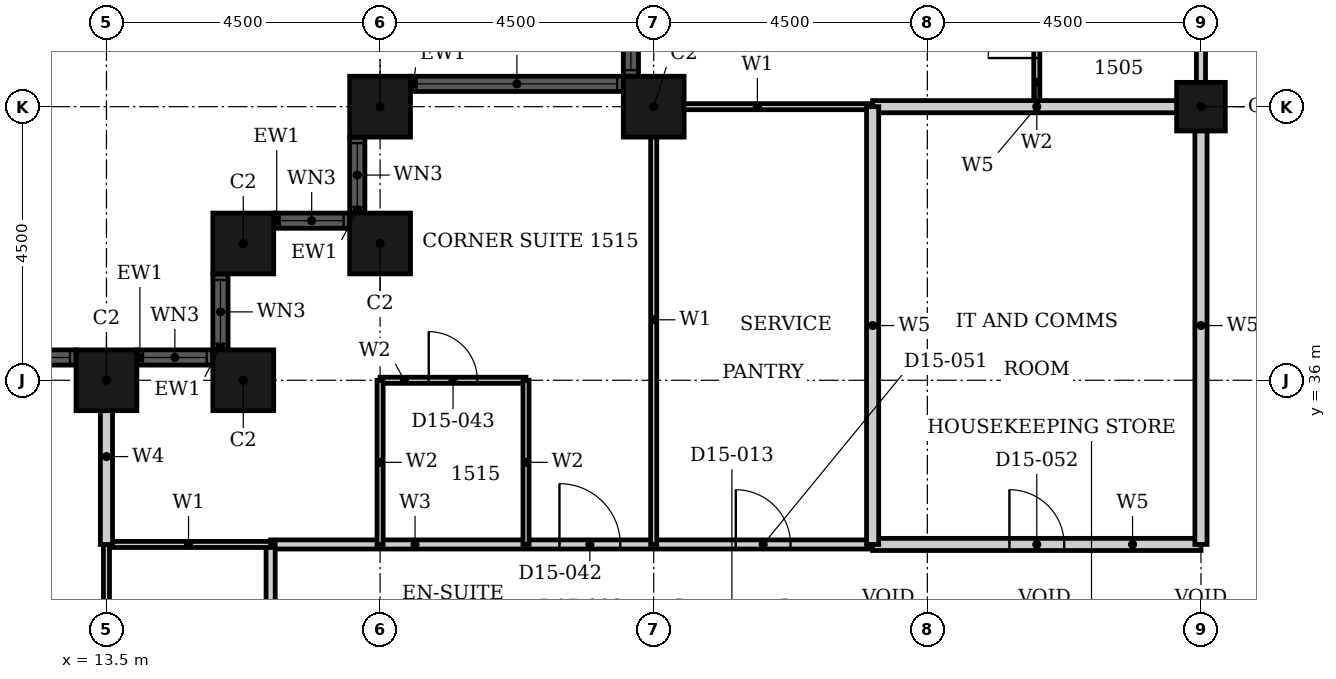
"""IFC4 building model, lengths in metres.
Left out: names, types, materials, properties, quantities, classifications, styles, units other than length and angle.
Written with IfcOpenShell. Run it as: python <this file> out.ifc"""

import sys

from ifc_helpers import new_model, si_unit, direction, frame, frame_2d, origin, origin_2d, place, context, subcontext, project, spatial, rectangle, hollow_rectangle, extrude, element, fill, save


model = new_model("IFC4")
c1 = context("Model", 3, precision=1e-05, world=origin(), true_north=direction((0.0, 1.0)))
c2 = subcontext(c1, "Body", "Model", "MODEL_VIEW")
j1 = project(units=[si_unit("LENGTHUNIT", "METRE"), si_unit("PLANEANGLEUNIT", "RADIAN")], contexts=[c1])
p1 = place(None, origin())
s1 = spatial("IfcSite", under=j1, at=p1, CompositionType="ELEMENT")
p2 = place(p1, origin())
s2 = spatial("IfcBuilding", under=s1, at=p2, CompositionType="ELEMENT")
p3 = place(p2, frame((0.0, 0.0, 67.2)))
s3 = spatial("IfcBuildingStorey", under=s2, at=p3, CompositionType="ELEMENT", Elevation=67.2)
for number, where, z_axis, x_axis in (
    (1, (22.5, 40.5, 0.0), (0.0, 0.0, 1.0), (1.0, 0.0, 0.0)),
    (2, (18.0, 40.5, 0.0), (0.0, 0.0, 1.0), (1.0, 0.0, 0.0)),
    (3, (18.0, 38.25, 0.0), (0.0, 0.0, 1.0), (1.0, 0.0, 0.0)),
    (4, (15.75, 38.25, 0.0), (0.0, 0.0, 1.0), (1.0, 0.0, 0.0)),
    (5, (15.75, 36.0, 0.0), (0.0, 0.0, 1.0), (1.0, 0.0, 0.0)),
    (6, (13.5, 36.0, 0.0), (0.0, 0.0, 1.0), (1.0, 0.0, 0.0)),
):
    element("IfcColumn", number, at=place(p3, frame(where, z_axis=z_axis, x_axis=x_axis)), inside=s3, PredefinedType="COLUMN", context=c2, shape_type="SweptSolid", body=[
        extrude(hollow_rectangle(XDim=1.0, YDim=1.0, WallThickness=0.032, at=origin_2d()), origin(), (0.0, 0.0, 1.0), 3.6),
    ])
p4 = place(p3, frame((31.5, 40.5, 0.0), z_axis=(0.0, 0.0, 1.0), x_axis=(1.0, 0.0, 0.0)))
e7 = element("IfcColumn", 7, at=p4, inside=s3, PredefinedType="COLUMN", context=c2, shape_type="SweptSolid", body=[
    extrude(hollow_rectangle(XDim=0.8, YDim=0.8, WallThickness=0.025, at=origin_2d()), origin(), (0.0, 0.0, 1.0), 3.6),
])
p5 = place(p3, frame((22.125, 49.0, 0.0), z_axis=(0.0, 0.0, 1.0), x_axis=(0.0, -1.0, 0.0)))
e8 = element("IfcWall", 8, at=p5, inside=s3, PredefinedType="SOLIDWALL", context=c2, shape_type="SweptSolid", body=[
    extrude(rectangle(XDim=8.0, YDim=0.25, at=frame_2d((4.0, 0.0))), origin(), (0.0, 0.0, 1.0), 3.6),
])
p6 = place(p5, frame((0.1, 0.0, 0.9)))
e9 = element("IfcOpeningElement", 9, at=p6, cuts=e8, PredefinedType="OPENING", context=c2, shape_type="SweptSolid", body=[
    extrude(rectangle(XDim=3.3, YDim=2.08, at=frame_2d((1.65, 1.04))), frame((0.0, 0.135, 0.0), z_axis=(0.0, -1.0, 0.0), x_axis=(1.0, 0.0, 0.0)), (0.0, 0.0, 1.0), 0.27),
])
p7 = place(p5, frame((4.6, 0.0, 0.9)))
e10 = element("IfcOpeningElement", 10, at=p7, cuts=e8, PredefinedType="OPENING", context=c2, shape_type="SweptSolid", body=[
    extrude(rectangle(XDim=3.3, YDim=2.08, at=frame_2d((1.65, 1.04))), frame((0.0, 0.135, 0.0), z_axis=(0.0, -1.0, 0.0), x_axis=(1.0, 0.0, 0.0)), (0.0, 0.0, 1.0), 0.27),
])
p8 = place(p3, frame((22.0, 40.875, 0.0), z_axis=(0.0, 0.0, 1.0), x_axis=(-1.0, 0.0, 0.0)))
e11 = element("IfcWall", 11, at=p8, inside=s3, PredefinedType="SOLIDWALL", context=c2, shape_type="SweptSolid", body=[
    extrude(rectangle(XDim=3.5, YDim=0.25, at=frame_2d((1.75, 0.0))), origin(), (0.0, 0.0, 1.0), 3.6),
])
p9 = place(p8, frame((0.1, 0.0, 0.9)))
e12 = element("IfcOpeningElement", 12, at=p9, cuts=e11, PredefinedType="OPENING", context=c2, shape_type="SweptSolid", body=[
    extrude(rectangle(XDim=3.3, YDim=2.08, at=frame_2d((1.65, 1.04))), frame((0.0, 0.135, 0.0), z_axis=(0.0, -1.0, 0.0), x_axis=(1.0, 0.0, 0.0)), (0.0, 0.0, 1.0), 0.27),
])
p10 = place(p3, frame((17.625, 40.0, 0.0), z_axis=(0.0, 0.0, 1.0), x_axis=(0.0, -1.0, 0.0)))
e13 = element("IfcWall", 13, at=p10, inside=s3, PredefinedType="SOLIDWALL", context=c2, shape_type="SweptSolid", body=[
    extrude(rectangle(XDim=1.25, YDim=0.25, at=frame_2d((0.625, 0.0))), origin(), (0.0, 0.0, 1.0), 3.6),
])
p11 = place(p10, frame((0.1, 0.0, 0.9)))
e14 = element("IfcOpeningElement", 14, at=p11, cuts=e13, PredefinedType="OPENING", context=c2, shape_type="SweptSolid", body=[
    extrude(rectangle(XDim=1.05, YDim=2.08, at=frame_2d((0.525, 1.04))), frame((0.0, 0.135, 0.0), z_axis=(0.0, -1.0, 0.0), x_axis=(1.0, 0.0, 0.0)), (0.0, 0.0, 1.0), 0.27),
])
p12 = place(p3, frame((17.5, 38.625, 0.0), z_axis=(0.0, 0.0, 1.0), x_axis=(-1.0, 0.0, 0.0)))
e15 = element("IfcWall", 15, at=p12, inside=s3, PredefinedType="SOLIDWALL", context=c2, shape_type="SweptSolid", body=[
    extrude(rectangle(XDim=1.25, YDim=0.25, at=frame_2d((0.625, 0.0))), origin(), (0.0, 0.0, 1.0), 3.6),
])
p13 = place(p12, frame((0.1, 0.0, 0.9)))
e16 = element("IfcOpeningElement", 16, at=p13, cuts=e15, PredefinedType="OPENING", context=c2, shape_type="SweptSolid", body=[
    extrude(rectangle(XDim=1.05, YDim=2.08, at=frame_2d((0.525, 1.04))), frame((0.0, 0.135, 0.0), z_axis=(0.0, -1.0, 0.0), x_axis=(1.0, 0.0, 0.0)), (0.0, 0.0, 1.0), 0.27),
])
p14 = place(p3, frame((15.375, 37.75, 0.0), z_axis=(0.0, 0.0, 1.0), x_axis=(0.0, -1.0, 0.0)))
e17 = element("IfcWall", 17, at=p14, inside=s3, PredefinedType="SOLIDWALL", context=c2, shape_type="SweptSolid", body=[
    extrude(rectangle(XDim=1.25, YDim=0.25, at=frame_2d((0.625, 0.0))), origin(), (0.0, 0.0, 1.0), 3.6),
])
p15 = place(p14, frame((0.1, 0.0, 0.9)))
e18 = element("IfcOpeningElement", 18, at=p15, cuts=e17, PredefinedType="OPENING", context=c2, shape_type="SweptSolid", body=[
    extrude(rectangle(XDim=1.05, YDim=2.08, at=frame_2d((0.525, 1.04))), frame((0.0, 0.135, 0.0), z_axis=(0.0, -1.0, 0.0), x_axis=(1.0, 0.0, 0.0)), (0.0, 0.0, 1.0), 0.27),
])
p16 = place(p3, frame((15.25, 36.375, 0.0), z_axis=(0.0, 0.0, 1.0), x_axis=(-1.0, 0.0, 0.0)))
e19 = element("IfcWall", 19, at=p16, inside=s3, PredefinedType="SOLIDWALL", context=c2, shape_type="SweptSolid", body=[
    extrude(rectangle(XDim=1.25, YDim=0.25, at=frame_2d((0.625, 0.0))), origin(), (0.0, 0.0, 1.0), 3.6),
])
p17 = place(p16, frame((0.1, 0.0, 0.9)))
e20 = element("IfcOpeningElement", 20, at=p17, cuts=e19, PredefinedType="OPENING", context=c2, shape_type="SweptSolid", body=[
    extrude(rectangle(XDim=1.05, YDim=2.08, at=frame_2d((0.525, 1.04))), frame((0.0, 0.135, 0.0), z_axis=(0.0, -1.0, 0.0), x_axis=(1.0, 0.0, 0.0)), (0.0, 0.0, 1.0), 0.27),
])
p18 = place(p3, frame((13.0, 36.375, 0.0), z_axis=(0.0, 0.0, 1.0), x_axis=(-1.0, 0.0, 0.0)))
e21 = element("IfcWall", 21, at=p18, inside=s3, PredefinedType="SOLIDWALL", context=c2, shape_type="SweptSolid", body=[
    extrude(rectangle(XDim=8.0, YDim=0.25, at=frame_2d((4.0, 0.0))), origin(), (0.0, 0.0, 1.0), 3.6),
])
p19 = place(p18, frame((0.1, 0.0, 0.9)))
e22 = element("IfcOpeningElement", 22, at=p19, cuts=e21, PredefinedType="OPENING", context=c2, shape_type="SweptSolid", body=[
    extrude(rectangle(XDim=3.3, YDim=2.08, at=frame_2d((1.65, 1.04))), frame((0.0, 0.135, 0.0), z_axis=(0.0, -1.0, 0.0), x_axis=(1.0, 0.0, 0.0)), (0.0, 0.0, 1.0), 0.27),
])
p20 = place(p18, frame((4.6, 0.0, 0.9)))
e23 = element("IfcOpeningElement", 23, at=p20, cuts=e21, PredefinedType="OPENING", context=c2, shape_type="SweptSolid", body=[
    extrude(rectangle(XDim=3.3, YDim=2.08, at=frame_2d((1.65, 1.04))), frame((0.0, 0.135, 0.0), z_axis=(0.0, -1.0, 0.0), x_axis=(1.0, 0.0, 0.0)), (0.0, 0.0, 1.0), 0.27),
])
p21 = place(p3, frame((16.2, 33.3, 0.0), z_axis=(0.0, 0.0, 1.0), x_axis=(1.0, 0.0, 0.0)))
e24 = element("IfcWall", 24, at=p21, inside=s3, PredefinedType="PARTITIONING", context=c2, shape_type="SweptSolid", body=[
    extrude(rectangle(XDim=9.9, YDim=0.15, at=frame_2d((4.95, 0.0))), origin(), (0.0, 0.0, 1.0), 3.3),
])
p22 = place(p21, frame((4.75, 0.0, 0.0)))
e25 = element("IfcOpeningElement", 25, at=p22, cuts=e24, PredefinedType="OPENING", context=c2, shape_type="SweptSolid", body=[
    extrude(rectangle(XDim=1.0, YDim=2.1, at=frame_2d((0.5, 1.05))), frame((0.0, 0.085, 0.0), z_axis=(0.0, -1.0, 0.0), x_axis=(1.0, 0.0, 0.0)), (0.0, 0.0, 1.0), 0.17),
])
p23 = place(p21, frame((7.65, 0.0, 0.0)))
e26 = element("IfcOpeningElement", 26, at=p23, cuts=e24, PredefinedType="OPENING", context=c2, shape_type="SweptSolid", body=[
    extrude(rectangle(XDim=0.9, YDim=2.1, at=frame_2d((0.45, 1.05))), frame((0.0, 0.085, 0.0), z_axis=(0.0, -1.0, 0.0), x_axis=(1.0, 0.0, 0.0)), (0.0, 0.0, 1.0), 0.17),
])
p24 = place(p3, frame((16.2, 27.0, 0.0), z_axis=(0.0, 0.0, 1.0), x_axis=(0.0, 1.0, 0.0)))
e27 = element("IfcWall", 27, at=p24, inside=s3, PredefinedType="PARTITIONING", context=c2, shape_type="SweptSolid", body=[
    extrude(rectangle(XDim=6.3, YDim=0.15, at=frame_2d((3.15, 0.0))), origin(), (0.0, 0.0, 1.0), 3.3),
])
p25 = place(p24, frame((2.55, 0.0, 0.0)))
e28 = element("IfcOpeningElement", 28, at=p25, cuts=e27, PredefinedType="OPENING", context=c2, shape_type="SweptSolid", body=[
    extrude(rectangle(XDim=0.9, YDim=2.1, at=frame_2d((0.45, 1.05))), frame((0.0, 0.085, 0.0), z_axis=(0.0, -1.0, 0.0), x_axis=(1.0, 0.0, 0.0)), (0.0, 0.0, 1.0), 0.17),
])
p26 = place(p3, frame((31.5, 40.5, 0.0), z_axis=(0.0, 0.0, 1.0), x_axis=(0.0, 1.0, 0.0)))
e29 = element("IfcWall", 29, at=p26, inside=s3, PredefinedType="PARTITIONING", context=c2, shape_type="SweptSolid", body=[
    extrude(rectangle(XDim=9.0, YDim=0.15, at=frame_2d((4.5, 0.0))), origin(), (0.0, 0.0, 1.0), 2.58),
])
p27 = place(p26, frame((2.95, 0.0, 0.0)))
e30 = element("IfcOpeningElement", 30, at=p27, cuts=e29, PredefinedType="OPENING", context=c2, shape_type="SweptSolid", body=[
    extrude(rectangle(XDim=1.0, YDim=2.1, at=frame_2d((0.5, 1.05))), frame((0.0, 0.085, 0.0), z_axis=(0.0, -1.0, 0.0), x_axis=(1.0, 0.0, 0.0)), (0.0, 0.0, 1.0), 0.17),
])
p28 = place(p26, frame((7.45, 0.0, 0.0)))
e31 = element("IfcOpeningElement", 31, at=p28, cuts=e29, PredefinedType="OPENING", context=c2, shape_type="SweptSolid", body=[
    extrude(rectangle(XDim=1.0, YDim=2.1, at=frame_2d((0.5, 1.05))), frame((0.0, 0.085, 0.0), z_axis=(0.0, -1.0, 0.0), x_axis=(1.0, 0.0, 0.0)), (0.0, 0.0, 1.0), 0.17),
])
p29 = place(p3, frame((13.5, 33.3, 0.0), z_axis=(0.0, 0.0, 1.0), x_axis=(1.0, 0.0, 0.0)))
e32 = element("IfcWall", 32, at=p29, inside=s3, PredefinedType="PARTITIONING", context=c2, shape_type="SweptSolid", body=[
    extrude(rectangle(XDim=2.7, YDim=0.1, at=frame_2d((1.35, 0.0))), origin(), (0.0, 0.0, 1.0), 3.3),
])
p30 = place(p3, frame((22.31, 40.5, 0.0), z_axis=(0.0, 0.0, 1.0), x_axis=(1.0, 0.0, 0.0)))
e33 = element("IfcWall", 33, at=p30, inside=s3, PredefinedType="PARTITIONING", context=c2, shape_type="SweptSolid", body=[
    extrude(rectangle(XDim=3.79, YDim=0.1, at=frame_2d((1.895, 0.0))), origin(), (0.0, 0.0, 1.0), 2.38),
])
p31 = place(p3, frame((13.5, 27.0, 0.0), z_axis=(0.0, 0.0, 1.0), x_axis=(0.0, 1.0, 0.0)))
e34 = element("IfcWall", 34, at=p31, inside=s3, PredefinedType="PARTITIONING", context=c2, shape_type="SweptSolid", body=[
    extrude(rectangle(XDim=6.3, YDim=0.1, at=frame_2d((3.15, 0.0))), origin(), (0.0, 0.0, 1.0), 2.38),
])
p32 = place(p3, frame((22.5, 33.3, 0.0), z_axis=(0.0, 0.0, 1.0), x_axis=(0.0, 1.0, 0.0)))
e35 = element("IfcWall", 35, at=p32, inside=s3, PredefinedType="PARTITIONING", context=c2, shape_type="SweptSolid", body=[
    extrude(rectangle(XDim=7.39, YDim=0.1, at=frame_2d((3.695, 0.0))), origin(), (0.0, 0.0, 1.0), 3.3),
])
p33 = place(p3, frame((13.5, 33.3, 0.0), z_axis=(0.0, 0.0, 1.0), x_axis=(0.0, 1.0, 0.0)))
e36 = element("IfcWall", 36, at=p33, inside=s3, PredefinedType="PARTITIONING", context=c2, shape_type="SweptSolid", body=[
    extrude(rectangle(XDim=2.89, YDim=0.2, at=frame_2d((1.445, 0.0))), origin(), (0.0, 0.0, 1.0), 2.38),
])
p34 = place(p3, frame((18.0, 36.0, 0.0), z_axis=(0.0, 0.0, 1.0), x_axis=(1.0, 0.0, 0.0)))
e37 = element("IfcWall", 37, at=p34, inside=s3, PredefinedType="PARTITIONING", context=c2, shape_type="SweptSolid", body=[
    extrude(rectangle(XDim=2.4, YDim=0.1, at=frame_2d((1.2, 0.0))), origin(), (0.0, 0.0, 1.0), 3.3),
])
p35 = place(p34, frame((0.8, 0.0, 0.0)))
e38 = element("IfcOpeningElement", 38, at=p35, cuts=e37, PredefinedType="OPENING", context=c2, shape_type="SweptSolid", body=[
    extrude(rectangle(XDim=0.8, YDim=2.1, at=frame_2d((0.4, 1.05))), frame((0.0, 0.06, 0.0), z_axis=(0.0, -1.0, 0.0), x_axis=(1.0, 0.0, 0.0)), (0.0, 0.0, 1.0), 0.12),
])
for number, where, z_axis, x_axis in (
    (39, (18.0, 33.3, 0.0), (0.0, 0.0, 1.0), (0.0, 1.0, 0.0)),
    (40, (20.4, 33.3, 0.0), (0.0, 0.0, 1.0), (0.0, 1.0, 0.0)),
):
    element("IfcWall", number, at=place(p3, frame(where, z_axis=z_axis, x_axis=x_axis)), inside=s3, PredefinedType="PARTITIONING", context=c2, shape_type="SweptSolid", body=[
        extrude(rectangle(XDim=2.7, YDim=0.1, at=frame_2d((1.35, 0.0))), origin(), (0.0, 0.0, 1.0), 3.3),
    ])
p36 = place(p3, frame((28.8, 40.5, 0.0), z_axis=(0.0, 0.0, 1.0), x_axis=(0.0, 1.0, 0.0)))
e41 = element("IfcWall", 41, at=p36, inside=s3, PredefinedType="PARTITIONING", context=c2, shape_type="SweptSolid", body=[
    extrude(rectangle(XDim=2.4, YDim=0.1, at=frame_2d((1.2, 0.0))), origin(), (0.0, 0.0, 1.0), 3.3),
])
p37 = place(p36, frame((0.8, 0.0, 0.0)))
e42 = element("IfcOpeningElement", 42, at=p37, cuts=e41, PredefinedType="OPENING", context=c2, shape_type="SweptSolid", body=[
    extrude(rectangle(XDim=0.8, YDim=2.1, at=frame_2d((0.4, 1.05))), frame((0.0, 0.06, 0.0), z_axis=(0.0, -1.0, 0.0), x_axis=(1.0, 0.0, 0.0)), (0.0, 0.0, 1.0), 0.12),
])
p38 = place(p3, frame((26.1, 33.3, 0.0), z_axis=(0.0, 0.0, 1.0), x_axis=(1.0, 0.0, 0.0)))
e43 = element("IfcWall", 43, at=p38, inside=s3, PredefinedType="PARTITIONING", context=c2, shape_type="SweptSolid", body=[
    extrude(rectangle(XDim=5.4, YDim=0.2, at=frame_2d((2.7, 0.0))), origin(), (0.0, 0.0, 1.0), 3.3),
])
p39 = place(p38, frame((2.25, 0.0, 0.0)))
e44 = element("IfcOpeningElement", 44, at=p39, cuts=e43, PredefinedType="OPENING", context=c2, shape_type="SweptSolid", body=[
    extrude(rectangle(XDim=0.9, YDim=2.1, at=frame_2d((0.45, 1.05))), frame((0.0, 0.11, 0.0), z_axis=(0.0, -1.0, 0.0), x_axis=(1.0, 0.0, 0.0)), (0.0, 0.0, 1.0), 0.22),
])
p40 = place(p3, frame((26.1, 40.5, 0.0), z_axis=(0.0, 0.0, 1.0), x_axis=(1.0, 0.0, 0.0)))
e45 = element("IfcWall", 45, at=p40, inside=s3, PredefinedType="PARTITIONING", context=c2, shape_type="SweptSolid", body=[
    extrude(rectangle(XDim=5.4, YDim=0.2, at=frame_2d((2.7, 0.0))), origin(), (0.0, 0.0, 1.0), 2.38),
])
for number, where, z_axis, x_axis in (
    (46, (26.1, 33.3, 0.0), (0.0, 0.0, 1.0), (0.0, 1.0, 0.0)),
    (47, (31.5, 33.3, 0.0), (0.0, 0.0, 1.0), (0.0, 1.0, 0.0)),
):
    element("IfcWall", number, at=place(p3, frame(where, z_axis=z_axis, x_axis=x_axis)), inside=s3, PredefinedType="PARTITIONING", context=c2, shape_type="SweptSolid", body=[
        extrude(rectangle(XDim=7.2, YDim=0.2, at=frame_2d((3.6, 0.0))), origin(), (0.0, 0.0, 1.0), 3.3),
    ])
p41 = place(p7, origin())
e48 = element("IfcWindow", 48, at=p41, inside=s3, PartitioningType="SINGLE_PANEL", PredefinedType="WINDOW", context=c2, shape_type="SweptSolid", body=[
    extrude(rectangle(XDim=3.3, YDim=2.08, at=frame_2d((1.65, 1.04))), frame((0.0, 0.03, 0.0), z_axis=(0.0, -1.0, 0.0), x_axis=(1.0, 0.0, 0.0)), (0.0, 0.0, 1.0), 0.06),
])
fill(e10, e48)
p42 = place(p9, origin())
e49 = element("IfcWindow", 49, at=p42, inside=s3, PartitioningType="SINGLE_PANEL", PredefinedType="WINDOW", context=c2, shape_type="SweptSolid", body=[
    extrude(rectangle(XDim=3.3, YDim=2.08, at=frame_2d((1.65, 1.04))), frame((0.0, 0.03, 0.0), z_axis=(0.0, -1.0, 0.0), x_axis=(1.0, 0.0, 0.0)), (0.0, 0.0, 1.0), 0.06),
])
fill(e12, e49)
p43 = place(p11, origin())
e50 = element("IfcWindow", 50, at=p43, inside=s3, PartitioningType="SINGLE_PANEL", PredefinedType="WINDOW", context=c2, shape_type="SweptSolid", body=[
    extrude(rectangle(XDim=1.05, YDim=2.08, at=frame_2d((0.525, 1.04))), frame((0.0, 0.03, 0.0), z_axis=(0.0, -1.0, 0.0), x_axis=(1.0, 0.0, 0.0)), (0.0, 0.0, 1.0), 0.06),
])
fill(e14, e50)
p44 = place(p13, origin())
e51 = element("IfcWindow", 51, at=p44, inside=s3, PartitioningType="SINGLE_PANEL", PredefinedType="WINDOW", context=c2, shape_type="SweptSolid", body=[
    extrude(rectangle(XDim=1.05, YDim=2.08, at=frame_2d((0.525, 1.04))), frame((0.0, 0.03, 0.0), z_axis=(0.0, -1.0, 0.0), x_axis=(1.0, 0.0, 0.0)), (0.0, 0.0, 1.0), 0.06),
])
fill(e16, e51)
p45 = place(p15, origin())
e52 = element("IfcWindow", 52, at=p45, inside=s3, PartitioningType="SINGLE_PANEL", PredefinedType="WINDOW", context=c2, shape_type="SweptSolid", body=[
    extrude(rectangle(XDim=1.05, YDim=2.08, at=frame_2d((0.525, 1.04))), frame((0.0, 0.03, 0.0), z_axis=(0.0, -1.0, 0.0), x_axis=(1.0, 0.0, 0.0)), (0.0, 0.0, 1.0), 0.06),
])
fill(e18, e52)
p46 = place(p17, origin())
e53 = element("IfcWindow", 53, at=p46, inside=s3, PartitioningType="SINGLE_PANEL", PredefinedType="WINDOW", context=c2, shape_type="SweptSolid", body=[
    extrude(rectangle(XDim=1.05, YDim=2.08, at=frame_2d((0.525, 1.04))), frame((0.0, 0.03, 0.0), z_axis=(0.0, -1.0, 0.0), x_axis=(1.0, 0.0, 0.0)), (0.0, 0.0, 1.0), 0.06),
])
fill(e20, e53)
p47 = place(p19, origin())
e54 = element("IfcWindow", 54, at=p47, inside=s3, PartitioningType="SINGLE_PANEL", PredefinedType="WINDOW", context=c2, shape_type="SweptSolid", body=[
    extrude(rectangle(XDim=3.3, YDim=2.08, at=frame_2d((1.65, 1.04))), frame((0.0, 0.03, 0.0), z_axis=(0.0, -1.0, 0.0), x_axis=(1.0, 0.0, 0.0)), (0.0, 0.0, 1.0), 0.06),
])
fill(e22, e54)
p48 = place(p37, origin())
e55 = element("IfcDoor", 55, at=p48, inside=s3, OperationType="SINGLE_SWING_RIGHT", PredefinedType="DOOR", context=c2, shape_type="SweptSolid", body=[
    extrude(rectangle(XDim=0.8, YDim=2.1, at=frame_2d((0.4, 1.05))), frame((0.0, 0.025, 0.0), z_axis=(0.0, -1.0, 0.0), x_axis=(1.0, 0.0, 0.0)), (0.0, 0.0, 1.0), 0.05),
])
fill(e42, e55)
p49 = place(p22, origin())
e56 = element("IfcDoor", 56, at=p49, inside=s3, OperationType="SINGLE_SWING_RIGHT", PredefinedType="DOOR", context=c2, shape_type="SweptSolid", body=[
    extrude(rectangle(XDim=1.0, YDim=2.1, at=frame_2d((0.5, 1.05))), frame((0.0, 0.025, 0.0), z_axis=(0.0, -1.0, 0.0), x_axis=(1.0, 0.0, 0.0)), (0.0, 0.0, 1.0), 0.05),
])
fill(e25, e56)
p50 = place(p35, origin())
e57 = element("IfcDoor", 57, at=p50, inside=s3, OperationType="SINGLE_SWING_LEFT", PredefinedType="DOOR", context=c2, shape_type="SweptSolid", body=[
    extrude(rectangle(XDim=0.8, YDim=2.1, at=frame_2d((0.4, 1.05))), frame((0.0, 0.025, 0.0), z_axis=(0.0, -1.0, 0.0), x_axis=(1.0, 0.0, 0.0)), (0.0, 0.0, 1.0), 0.05),
])
fill(e38, e57)
p51 = place(p23, origin())
e58 = element("IfcDoor", 58, at=p51, inside=s3, OperationType="SINGLE_SWING_LEFT", PredefinedType="DOOR", context=c2, shape_type="SweptSolid", body=[
    extrude(rectangle(XDim=0.9, YDim=2.1, at=frame_2d((0.45, 1.05))), frame((0.0, 0.025, 0.0), z_axis=(0.0, -1.0, 0.0), x_axis=(1.0, 0.0, 0.0)), (0.0, 0.0, 1.0), 0.05),
])
fill(e26, e58)
p52 = place(p39, origin())
e59 = element("IfcDoor", 59, at=p52, inside=s3, OperationType="SINGLE_SWING_RIGHT", PredefinedType="DOOR", context=c2, shape_type="SweptSolid", body=[
    extrude(rectangle(XDim=0.9, YDim=2.1, at=frame_2d((0.45, 1.05))), frame((0.0, 0.025, 0.0), z_axis=(0.0, -1.0, 0.0), x_axis=(1.0, 0.0, 0.0)), (0.0, 0.0, 1.0), 0.05),
])
fill(e44, e59)
save(model, sys.argv[1])
